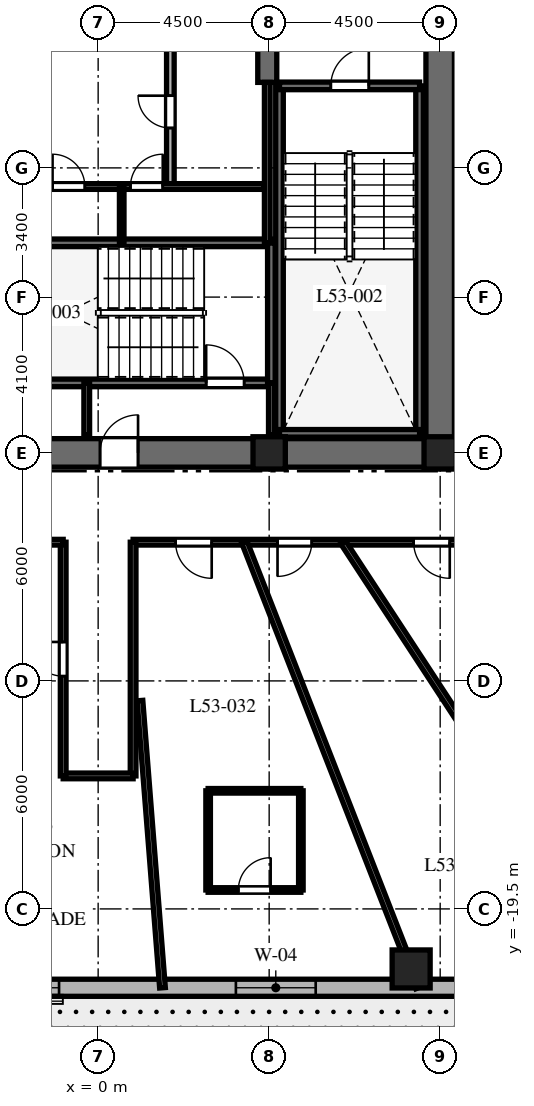
"""IFC4 building model, lengths in metres.
Left out: names, types, materials, properties, quantities, classifications, styles, units other than length and angle.
Written with IfcOpenShell. Run it as: python <this file> out.ifc"""

import sys

from ifc_helpers import new_model, si_unit, direction, frame, frame_2d, origin, origin_2d, place, context, subcontext, project, spatial, rectangle, extrude, element, fill, save


model = new_model("IFC4")
c1 = context("Model", 3, precision=1e-05, world=origin(), true_north=direction((0.0, 1.0)))
c2 = subcontext(c1, "Body", "Model", "MODEL_VIEW")
j1 = project(units=[si_unit("LENGTHUNIT", "METRE"), si_unit("PLANEANGLEUNIT", "RADIAN")], contexts=[c1])
p1 = place(None, origin())
s1 = spatial("IfcSite", under=j1, at=p1, CompositionType="ELEMENT")
p2 = place(p1, origin())
s2 = spatial("IfcBuilding", under=s1, at=p2, CompositionType="ELEMENT")
p3 = place(p2, frame((0.0, 0.0, 214.1)))
s3 = spatial("IfcBuildingStorey", under=s2, at=p3, CompositionType="ELEMENT", Elevation=214.1)
p4 = place(p3, frame((-9.375, -7.5, 0.0), z_axis=(0.0, 0.0, 1.0), x_axis=(1.0, 0.0, 0.0)))
e1 = element("IfcWall", 1, at=p4, inside=s3, PredefinedType="SHEAR", context=c2, shape_type="SweptSolid", body=[
    extrude(rectangle(XDim=18.75, YDim=0.75, at=frame_2d((9.375, 0.0))), origin(), (0.0, 0.0, 1.0), 3.8),
])
p5 = place(p4, frame((9.425, 0.0, 0.0)))
e2 = element("IfcOpeningElement", 2, at=p5, cuts=e1, PredefinedType="OPENING", context=c2, shape_type="SweptSolid", body=[
    extrude(rectangle(XDim=1.0, YDim=2.15, at=frame_2d((0.5, 1.075))), frame((0.0, 0.385, 0.0), z_axis=(0.0, -1.0, 0.0), x_axis=(1.0, 0.0, 0.0)), (0.0, 0.0, 1.0), 0.77),
])
p6 = place(p3, frame((9.0, -7.125, 0.0), z_axis=(0.0, 0.0, 1.0), x_axis=(0.0, 1.0, 0.0)))
e3 = element("IfcWall", 3, at=p6, inside=s3, PredefinedType="SHEAR", context=c2, shape_type="SweptSolid", body=[
    extrude(rectangle(XDim=14.25, YDim=0.75, at=frame_2d((7.125, 0.0))), origin(), (0.0, 0.0, 1.0), 3.8),
])
p7 = place(p6, frame((10.25, 0.0, 0.0)))
e4 = element("IfcOpeningElement", 4, at=p7, cuts=e3, PredefinedType="OPENING", context=c2, shape_type="SweptSolid", body=[
    extrude(rectangle(XDim=1.05, YDim=2.15, at=frame_2d((0.525, 1.075))), frame((0.0, 0.385, 0.0), z_axis=(0.0, -1.0, 0.0), x_axis=(1.0, 0.0, 0.0)), (0.0, 0.0, 1.0), 0.77),
])
p8 = place(p3, frame((4.45, 2.25, 0.0), z_axis=(0.0, 0.0, 1.0), x_axis=(0.0, 1.0, 0.0)))
e5 = element("IfcWall", 5, at=p8, inside=s3, PredefinedType="SHEAR", context=c2, shape_type="SweptSolid", body=[
    extrude(rectangle(XDim=4.875, YDim=0.5, at=frame_2d((2.438, 0.0))), origin(), (0.0, 0.0, 1.0), 3.8),
])
for number, where, z_axis, x_axis in (
    (6, (4.772, -6.985, 0.0), (0.0, 0.0, 1.0), (0.0, 1.0, 0.0)),
    (7, (8.458, -6.985, 0.0), (0.0, 0.0, 1.0), (0.0, 1.0, 0.0)),
):
    element("IfcWall", number, at=place(p3, frame(where, z_axis=z_axis, x_axis=x_axis)), inside=s3, PredefinedType="SHEAR", context=c2, shape_type="SweptSolid", body=[
        extrude(rectangle(XDim=9.143, YDim=0.2, at=frame_2d((4.572, 0.0))), origin(), (0.0, 0.0, 1.0), 3.8),
    ])
p9 = place(p3, frame((4.772, -6.985, 0.0), z_axis=(0.0, 0.0, 1.0), x_axis=(1.0, 0.0, 0.0)))
e8 = element("IfcWall", 8, at=p9, inside=s3, PredefinedType="SHEAR", context=c2, shape_type="SweptSolid", body=[
    extrude(rectangle(XDim=3.686, YDim=0.2, at=frame_2d((1.843, 0.0))), origin(), (0.0, 0.0, 1.0), 3.8),
])
p10 = place(p3, frame((4.772, 2.158, 0.0), z_axis=(0.0, 0.0, 1.0), x_axis=(1.0, 0.0, 0.0)))
e9 = element("IfcWall", 9, at=p10, inside=s3, PredefinedType="SHEAR", context=c2, shape_type="SweptSolid", body=[
    extrude(rectangle(XDim=3.686, YDim=0.2, at=frame_2d((1.843, 0.0))), origin(), (0.0, 0.0, 1.0), 3.8),
])
p11 = place(p10, frame((1.35, 0.0, 0.0)))
e10 = element("IfcOpeningElement", 10, at=p11, cuts=e9, PredefinedType="OPENING", context=c2, shape_type="SweptSolid", body=[
    extrude(rectangle(XDim=1.0, YDim=2.15, at=frame_2d((0.5, 1.075))), frame((0.0, 0.11, 0.0), z_axis=(0.0, -1.0, 0.0), x_axis=(1.0, 0.0, 0.0)), (0.0, 0.0, 1.0), 0.22),
])
p12 = place(p3, frame((-4.608, -5.658, 0.0), z_axis=(0.0, 0.0, 1.0), x_axis=(1.0, 0.0, 0.0)))
e11 = element("IfcWall", 11, at=p12, inside=s3, PredefinedType="SHEAR", context=c2, shape_type="SweptSolid", body=[
    extrude(rectangle(XDim=9.166, YDim=0.2, at=frame_2d((4.583, 0.0))), origin(), (0.0, 0.0, 1.0), 3.8),
])
p13 = place(p12, frame((7.45, 0.0, 0.0)))
e12 = element("IfcOpeningElement", 12, at=p13, cuts=e11, PredefinedType="OPENING", context=c2, shape_type="SweptSolid", body=[
    extrude(rectangle(XDim=1.0, YDim=2.15, at=frame_2d((0.5, 1.075))), frame((0.0, 0.11, 0.0), z_axis=(0.0, -1.0, 0.0), x_axis=(1.0, 0.0, 0.0)), (0.0, 0.0, 1.0), 0.22),
])
p14 = place(p3, frame((-4.608, -1.972, 0.0), z_axis=(0.0, 0.0, 1.0), x_axis=(1.0, 0.0, 0.0)))
e13 = element("IfcWall", 13, at=p14, inside=s3, PredefinedType="SHEAR", context=c2, shape_type="SweptSolid", body=[
    extrude(rectangle(XDim=9.166, YDim=0.2, at=frame_2d((4.583, 0.0))), origin(), (0.0, 0.0, 1.0), 3.8),
])
p15 = place(p3, frame((4.558, -5.658, 0.0), z_axis=(0.0, 0.0, 1.0), x_axis=(0.0, 1.0, 0.0)))
e14 = element("IfcWall", 14, at=p15, inside=s3, PredefinedType="SHEAR", context=c2, shape_type="SweptSolid", body=[
    extrude(rectangle(XDim=3.686, YDim=0.2, at=frame_2d((1.843, 0.0))), origin(), (0.0, 0.0, 1.0), 3.8),
])
for number, where, z_axis, x_axis in (
    (15, (4.5, -7.5, 0.0), (0.0, 0.0, 1.0), (1.0, 0.0, 0.0)),
    (16, (9.0, -7.5, 0.0), (0.0, 0.0, 1.0), (1.0, 0.0, 0.0)),
):
    element("IfcColumn", number, at=place(p3, frame(where, z_axis=z_axis, x_axis=x_axis)), inside=s3, PredefinedType="COLUMN", context=c2, shape_type="SweptSolid", body=[
        extrude(rectangle(XDim=0.85, YDim=0.85, at=origin_2d()), origin(), (0.0, 0.0, 1.0), 3.8),
    ])
p16 = place(p3, frame((8.236, -21.08, 0.0), z_axis=(0.0, 0.0, 1.0), x_axis=(1.0, 0.0, 0.0)))
e17 = element("IfcColumn", 17, at=p16, inside=s3, PredefinedType="COLUMN", context=c2, shape_type="SweptSolid", body=[
    extrude(rectangle(XDim=1.0, YDim=1.0, at=origin_2d()), origin(), (0.0, 0.0, 1.0), 3.8),
])
p17 = place(p3, frame((-11.298, -21.575, 0.0), z_axis=(0.0, 0.0, 1.0), x_axis=(1.0, 0.0, 0.0)))
e18 = element("IfcWall", 18, at=p17, inside=s3, PredefinedType="SOLIDWALL", context=c2, shape_type="SweptSolid", body=[
    extrude(rectangle(XDim=24.399, YDim=0.45, at=frame_2d((12.2, 0.0))), origin(), (0.0, 0.0, 1.0), 3.5),
])
p18 = place(p17, frame((2.55, 0.0, 0.0)))
e19 = element("IfcOpeningElement", 19, at=p18, cuts=e18, PredefinedType="OPENING", context=c2, shape_type="SweptSolid", body=[
    extrude(rectangle(XDim=1.0, YDim=2.15, at=frame_2d((0.5, 1.075))), frame((0.0, 0.235, 0.0), z_axis=(0.0, -1.0, 0.0), x_axis=(1.0, 0.0, 0.0)), (0.0, 0.0, 1.0), 0.47),
])
p19 = place(p17, frame((8.169, 0.0, 0.8)))
e20 = element("IfcOpeningElement", 20, at=p19, cuts=e18, PredefinedType="OPENING", context=c2, shape_type="SweptSolid", body=[
    extrude(rectangle(XDim=2.1, YDim=1.85, at=frame_2d((1.05, 0.925))), frame((0.0, 0.235, 0.0), z_axis=(0.0, -1.0, 0.0), x_axis=(1.0, 0.0, 0.0)), (0.0, 0.0, 1.0), 0.47),
])
p20 = place(p17, frame((14.922, 0.0, 0.8)))
e21 = element("IfcOpeningElement", 21, at=p20, cuts=e18, PredefinedType="OPENING", context=c2, shape_type="SweptSolid", body=[
    extrude(rectangle(XDim=2.1, YDim=1.85, at=frame_2d((1.05, 0.925))), frame((0.0, 0.235, 0.0), z_axis=(0.0, -1.0, 0.0), x_axis=(1.0, 0.0, 0.0)), (0.0, 0.0, 1.0), 0.47),
])
p21 = place(p17, frame((20.996, 0.0, 0.8)))
e22 = element("IfcOpeningElement", 22, at=p21, cuts=e18, PredefinedType="OPENING", context=c2, shape_type="SweptSolid", body=[
    extrude(rectangle(XDim=2.1, YDim=1.85, at=frame_2d((1.05, 0.925))), frame((0.0, 0.235, 0.0), z_axis=(0.0, -1.0, 0.0), x_axis=(1.0, 0.0, 0.0)), (0.0, 0.0, 1.0), 0.47),
])
for number, where, z_axis, x_axis in (
    (23, (-0.3, -7.02, 0.0), (0.0, 0.0, 1.0), (0.0, 1.0, 0.0)),
    (24, (4.558, -7.02, 0.0), (0.0, 0.0, 1.0), (0.0, 1.0, 0.0)),
):
    element("IfcWall", number, at=place(p3, frame(where, z_axis=z_axis, x_axis=x_axis)), inside=s3, PredefinedType="PARTITIONING", context=c2, shape_type="SweptSolid", body=[
        extrude(rectangle(XDim=1.362, YDim=0.15, at=frame_2d((0.681, 0.0))), origin(), (0.0, 0.0, 1.0), 3.5),
    ])
p22 = place(p3, frame((4.45, -1.972, 0.0), z_axis=(0.0, 0.0, 1.0), x_axis=(0.0, 1.0, 0.0)))
e25 = element("IfcWall", 25, at=p22, inside=s3, PredefinedType="PARTITIONING", context=c2, shape_type="SweptSolid", body=[
    extrude(rectangle(XDim=4.222, YDim=0.15, at=frame_2d((2.111, 0.0))), origin(), (0.0, 0.0, 1.0), 3.5),
])
p23 = place(p3, frame((1.9, -0.5, 0.0), z_axis=(0.0, 0.0, 1.0), x_axis=(0.0, 1.0, 0.0)))
e26 = element("IfcWall", 26, at=p23, inside=s3, PredefinedType="PARTITIONING", context=c2, shape_type="SweptSolid", body=[
    extrude(rectangle(XDim=4.44, YDim=0.2, at=frame_2d((2.22, 0.0))), origin(), (0.0, 0.0, 1.0), 3.5),
])
p24 = place(p23, frame((1.55, 0.0, 0.0)))
e27 = element("IfcOpeningElement", 27, at=p24, cuts=e26, PredefinedType="OPENING", context=c2, shape_type="SweptSolid", body=[
    extrude(rectangle(XDim=0.85, YDim=2.03, at=frame_2d((0.425, 1.015))), frame((0.0, 0.11, 0.0), z_axis=(0.0, -1.0, 0.0), x_axis=(1.0, 0.0, 0.0)), (0.0, 0.0, 1.0), 0.22),
])
p25 = place(p3, frame((-4.36, -0.49, 0.0), z_axis=(0.0, 0.0, 1.0), x_axis=(1.0, 0.0, 0.0)))
e28 = element("IfcWall", 28, at=p25, inside=s3, PredefinedType="PARTITIONING", context=c2, shape_type="SweptSolid", body=[
    extrude(rectangle(XDim=8.72, YDim=0.15, at=frame_2d((4.36, 0.0))), origin(), (0.0, 0.0, 1.0), 3.5),
])
p26 = place(p25, frame((3.16, 0.0, 0.0)))
e29 = element("IfcOpeningElement", 29, at=p26, cuts=e28, PredefinedType="OPENING", context=c2, shape_type="SweptSolid", body=[
    extrude(rectangle(XDim=0.85, YDim=2.03, at=frame_2d((0.425, 1.015))), frame((0.0, 0.085, 0.0), z_axis=(0.0, -1.0, 0.0), x_axis=(1.0, 0.0, 0.0)), (0.0, 0.0, 1.0), 0.17),
])
p27 = place(p25, frame((5.21, 0.0, 0.0)))
e30 = element("IfcOpeningElement", 30, at=p27, cuts=e28, PredefinedType="OPENING", context=c2, shape_type="SweptSolid", body=[
    extrude(rectangle(XDim=0.85, YDim=2.03, at=frame_2d((0.425, 1.015))), frame((0.0, 0.085, 0.0), z_axis=(0.0, -1.0, 0.0), x_axis=(1.0, 0.0, 0.0)), (0.0, 0.0, 1.0), 0.17),
])
p28 = place(p3, frame((0.62, -1.972, 0.0), z_axis=(0.0, 0.0, 1.0), x_axis=(0.0, 1.0, 0.0)))
e31 = element("IfcWall", 31, at=p28, inside=s3, PredefinedType="PARTITIONING", context=c2, shape_type="SweptSolid", body=[
    extrude(rectangle(XDim=1.472, YDim=0.12, at=frame_2d((0.736, 0.0))), origin(), (0.0, 0.0, 1.0), 3.5),
])
p29 = place(p3, frame((11.35, -9.85, 0.0), z_axis=(0.0, 0.0, 1.0), x_axis=(-1.0, 0.0, 0.0)))
e32 = element("IfcWall", 32, at=p29, inside=s3, PredefinedType="PARTITIONING", context=c2, shape_type="SweptSolid", body=[
    extrude(rectangle(XDim=10.43, YDim=0.15, at=frame_2d((5.215, 0.0))), origin(), (0.0, 0.0, 1.0), 2.99),
])
p30 = place(p29, frame((8.362, 0.0, 0.0)))
e33 = element("IfcOpeningElement", 33, at=p30, cuts=e32, PredefinedType="OPENING", context=c2, shape_type="SweptSolid", body=[
    extrude(rectangle(XDim=0.95, YDim=2.03, at=frame_2d((0.475, 1.015))), frame((0.0, 0.085, 0.0), z_axis=(0.0, -1.0, 0.0), x_axis=(1.0, 0.0, 0.0)), (0.0, 0.0, 1.0), 0.17),
])
p31 = place(p29, frame((5.73, 0.0, 0.0)))
e34 = element("IfcOpeningElement", 34, at=p31, cuts=e32, PredefinedType="OPENING", context=c2, shape_type="SweptSolid", body=[
    extrude(rectangle(XDim=0.9, YDim=2.03, at=frame_2d((0.45, 1.015))), frame((0.0, 0.085, 0.0), z_axis=(0.0, -1.0, 0.0), x_axis=(1.0, 0.0, 0.0)), (0.0, 0.0, 1.0), 0.17),
])
p32 = place(p29, frame((2.098, 0.0, 0.0)))
e35 = element("IfcOpeningElement", 35, at=p32, cuts=e32, PredefinedType="OPENING", context=c2, shape_type="SweptSolid", body=[
    extrude(rectangle(XDim=0.95, YDim=2.03, at=frame_2d((0.475, 1.015))), frame((0.0, 0.085, 0.0), z_axis=(0.0, -1.0, 0.0), x_axis=(1.0, 0.0, 0.0)), (0.0, 0.0, 1.0), 0.17),
])
p33 = place(p3, frame((0.92, -9.85, 0.0), z_axis=(0.0, 0.0, 1.0), x_axis=(0.0, -1.0, 0.0)))
e36 = element("IfcWall", 36, at=p33, inside=s3, PredefinedType="PARTITIONING", context=c2, shape_type="SweptSolid", body=[
    extrude(rectangle(XDim=6.15, YDim=0.15, at=frame_2d((3.075, 0.0))), origin(), (0.0, 0.0, 1.0), 3.026),
])
p34 = place(p3, frame((0.92, -16.0, 0.0), z_axis=(0.0, 0.0, 1.0), x_axis=(-1.0, 0.0, 0.0)))
e37 = element("IfcWall", 37, at=p34, inside=s3, PredefinedType="PARTITIONING", context=c2, shape_type="SweptSolid", body=[
    extrude(rectangle(XDim=1.84, YDim=0.15, at=frame_2d((0.92, 0.0))), origin(), (0.0, 0.0, 1.0), 3.5),
])
p35 = place(p3, frame((-0.92, -16.0, 0.0), z_axis=(0.0, 0.0, 1.0), x_axis=(0.0, 1.0, 0.0)))
e38 = element("IfcWall", 38, at=p35, inside=s3, PredefinedType="PARTITIONING", context=c2, shape_type="SweptSolid", body=[
    extrude(rectangle(XDim=6.15, YDim=0.15, at=frame_2d((3.075, 0.0))), origin(), (0.0, 0.0, 1.0), 3.026),
])
p36 = place(p35, frame((2.625, 0.0, 0.0)))
e39 = element("IfcOpeningElement", 39, at=p36, cuts=e38, PredefinedType="OPENING", context=c2, shape_type="SweptSolid", body=[
    extrude(rectangle(XDim=0.9, YDim=2.03, at=frame_2d((0.45, 1.015))), frame((0.0, 0.085, 0.0), z_axis=(0.0, -1.0, 0.0), x_axis=(1.0, 0.0, 0.0)), (0.0, 0.0, 1.0), 0.17),
])
p37 = place(p3, frame((-0.92, -9.85, 0.0), z_axis=(0.0, 0.0, 1.0), x_axis=(-1.0, 0.0, 0.0)))
e40 = element("IfcWall", 40, at=p37, inside=s3, PredefinedType="PARTITIONING", context=c2, shape_type="SweptSolid", body=[
    extrude(rectangle(XDim=10.43, YDim=0.15, at=frame_2d((5.215, 0.0))), origin(), (0.0, 0.0, 1.0), 2.99),
])
p38 = place(p37, frame((4.949, 0.0, 0.0)))
e41 = element("IfcOpeningElement", 41, at=p38, cuts=e40, PredefinedType="OPENING", context=c2, shape_type="SweptSolid", body=[
    extrude(rectangle(XDim=0.95, YDim=2.03, at=frame_2d((0.475, 1.015))), frame((0.0, 0.085, 0.0), z_axis=(0.0, -1.0, 0.0), x_axis=(1.0, 0.0, 0.0)), (0.0, 0.0, 1.0), 0.17),
])
p39 = place(p3, frame((1.1, -14.018, 0.0), z_axis=(0.0, 0.0, 1.0), x_axis=(0.078228275349, -0.996935472804, 0.0)))
e42 = element("IfcWall", 42, at=p39, inside=s3, PredefinedType="PARTITIONING", context=c2, shape_type="SweptSolid", body=[
    extrude(rectangle(XDim=7.581, YDim=0.15, at=frame_2d((3.79, 0.0))), origin(), (0.0, 0.0, 1.0), 2.74),
])
p40 = place(p3, frame((3.848, -9.85, 0.0), z_axis=(0.0, 0.0, 1.0), x_axis=(0.363921778212, -0.931429513889, 0.0)))
e43 = element("IfcWall", 43, at=p40, inside=s3, PredefinedType="PARTITIONING", context=c2, shape_type="SweptSolid", body=[
    extrude(rectangle(XDim=12.588, YDim=0.15, at=frame_2d((6.294, 0.0))), origin(), (0.0, 0.0, 1.0), 2.74),
])
p41 = place(p3, frame((6.444, -9.85, 0.0), z_axis=(0.0, 0.0, 1.0), x_axis=(0.547492333129, -0.836810698525, 0.0)))
e44 = element("IfcWall", 44, at=p41, inside=s3, PredefinedType="PARTITIONING", context=c2, shape_type="SweptSolid", body=[
    extrude(rectangle(XDim=13.616, YDim=0.15, at=frame_2d((6.808, 0.0))), origin(), (0.0, 0.0, 1.0), 2.74),
])
p42 = place(p3, frame((2.894, -19.002, 0.0), z_axis=(0.0, 0.0, 1.0), x_axis=(1.0, 0.0, 0.0)))
e45 = element("IfcWall", 45, at=p42, inside=s3, PredefinedType="PARTITIONING", context=c2, shape_type="SweptSolid", body=[
    extrude(rectangle(XDim=2.44, YDim=0.12, at=frame_2d((1.22, 0.0))), origin(), (0.0, 0.0, 1.0), 3.5),
])
p43 = place(p42, frame((0.795, 0.0, 0.0)))
e46 = element("IfcOpeningElement", 46, at=p43, cuts=e45, PredefinedType="OPENING", context=c2, shape_type="SweptSolid", body=[
    extrude(rectangle(XDim=0.85, YDim=2.03, at=frame_2d((0.425, 1.015))), frame((0.0, 0.07, 0.0), z_axis=(0.0, -1.0, 0.0), x_axis=(1.0, 0.0, 0.0)), (0.0, 0.0, 1.0), 0.14),
])
p44 = place(p3, frame((5.334, -19.002, 0.0), z_axis=(0.0, 0.0, 1.0), x_axis=(0.0, 1.0, 0.0)))
e47 = element("IfcWall", 47, at=p44, inside=s3, PredefinedType="PARTITIONING", context=c2, shape_type="SweptSolid", body=[
    extrude(rectangle(XDim=2.61, YDim=0.12, at=frame_2d((1.305, 0.0))), origin(), (0.0, 0.0, 1.0), 2.94),
])
p45 = place(p3, frame((5.334, -16.392, 0.0), z_axis=(0.0, 0.0, 1.0), x_axis=(-1.0, 0.0, 0.0)))
e48 = element("IfcWall", 48, at=p45, inside=s3, PredefinedType="PARTITIONING", context=c2, shape_type="SweptSolid", body=[
    extrude(rectangle(XDim=2.44, YDim=0.12, at=frame_2d((1.22, 0.0))), origin(), (0.0, 0.0, 1.0), 3.5),
])
p46 = place(p3, frame((2.894, -16.392, 0.0), z_axis=(0.0, 0.0, 1.0), x_axis=(0.0, -1.0, 0.0)))
e49 = element("IfcWall", 49, at=p46, inside=s3, PredefinedType="PARTITIONING", context=c2, shape_type="SweptSolid", body=[
    extrude(rectangle(XDim=2.61, YDim=0.12, at=frame_2d((1.305, 0.0))), origin(), (0.0, 0.0, 1.0), 2.94),
])
p47 = place(p19, origin())
e50 = element("IfcWindow", 50, at=p47, inside=s3, PartitioningType="SINGLE_PANEL", PredefinedType="WINDOW", context=c2, shape_type="SweptSolid", body=[
    extrude(rectangle(XDim=2.1, YDim=1.85, at=frame_2d((1.05, 0.925))), frame((0.0, 0.03, 0.0), z_axis=(0.0, -1.0, 0.0), x_axis=(1.0, 0.0, 0.0)), (0.0, 0.0, 1.0), 0.06),
])
fill(e20, e50)
p48 = place(p20, origin())
e51 = element("IfcWindow", 51, at=p48, inside=s3, PartitioningType="SINGLE_PANEL", PredefinedType="WINDOW", context=c2, shape_type="SweptSolid", body=[
    extrude(rectangle(XDim=2.1, YDim=1.85, at=frame_2d((1.05, 0.925))), frame((0.0, 0.03, 0.0), z_axis=(0.0, -1.0, 0.0), x_axis=(1.0, 0.0, 0.0)), (0.0, 0.0, 1.0), 0.06),
])
fill(e21, e51)
p49 = place(p11, origin())
e52 = element("IfcDoor", 52, at=p49, inside=s3, OperationType="SINGLE_SWING_RIGHT", PredefinedType="DOOR", context=c2, shape_type="SweptSolid", body=[
    extrude(rectangle(XDim=1.0, YDim=2.15, at=frame_2d((0.5, 1.075))), frame((0.0, 0.025, 0.0), z_axis=(0.0, -1.0, 0.0), x_axis=(1.0, 0.0, 0.0)), (0.0, 0.0, 1.0), 0.05),
])
fill(e10, e52)
p50 = place(p13, origin())
e53 = element("IfcDoor", 53, at=p50, inside=s3, OperationType="SINGLE_SWING_LEFT", PredefinedType="DOOR", context=c2, shape_type="SweptSolid", body=[
    extrude(rectangle(XDim=1.0, YDim=2.15, at=frame_2d((0.5, 1.075))), frame((0.0, 0.025, 0.0), z_axis=(0.0, -1.0, 0.0), x_axis=(1.0, 0.0, 0.0)), (0.0, 0.0, 1.0), 0.05),
])
fill(e12, e53)
p51 = place(p5, origin())
e54 = element("IfcDoor", 54, at=p51, inside=s3, OperationType="SINGLE_SWING_RIGHT", PredefinedType="DOOR", context=c2, shape_type="SweptSolid", body=[
    extrude(rectangle(XDim=1.0, YDim=2.15, at=frame_2d((0.5, 1.075))), frame((0.0, 0.025, 0.0), z_axis=(0.0, -1.0, 0.0), x_axis=(1.0, 0.0, 0.0)), (0.0, 0.0, 1.0), 0.05),
])
fill(e2, e54)
p52 = place(p24, origin())
e55 = element("IfcDoor", 55, at=p52, inside=s3, OperationType="SINGLE_SWING_RIGHT", PredefinedType="DOOR", context=c2, shape_type="SweptSolid", body=[
    extrude(rectangle(XDim=0.85, YDim=2.03, at=frame_2d((0.425, 1.015))), frame((0.0, 0.025, 0.0), z_axis=(0.0, -1.0, 0.0), x_axis=(1.0, 0.0, 0.0)), (0.0, 0.0, 1.0), 0.05),
])
fill(e27, e55)
p53 = place(p26, origin())
e56 = element("IfcDoor", 56, at=p53, inside=s3, OperationType="SINGLE_SWING_LEFT", PredefinedType="DOOR", context=c2, shape_type="SweptSolid", body=[
    extrude(rectangle(XDim=0.85, YDim=2.03, at=frame_2d((0.425, 1.015))), frame((0.0, 0.025, 0.0), z_axis=(0.0, -1.0, 0.0), x_axis=(1.0, 0.0, 0.0)), (0.0, 0.0, 1.0), 0.05),
])
fill(e29, e56)
p54 = place(p27, origin())
e57 = element("IfcDoor", 57, at=p54, inside=s3, OperationType="SINGLE_SWING_RIGHT", PredefinedType="DOOR", context=c2, shape_type="SweptSolid", body=[
    extrude(rectangle(XDim=0.85, YDim=2.03, at=frame_2d((0.425, 1.015))), frame((0.0, 0.025, 0.0), z_axis=(0.0, -1.0, 0.0), x_axis=(1.0, 0.0, 0.0)), (0.0, 0.0, 1.0), 0.05),
])
fill(e30, e57)
p55 = place(p36, origin())
e58 = element("IfcDoor", 58, at=p55, inside=s3, OperationType="SINGLE_SWING_RIGHT", PredefinedType="DOOR", context=c2, shape_type="SweptSolid", body=[
    extrude(rectangle(XDim=0.9, YDim=2.03, at=frame_2d((0.45, 1.015))), frame((0.0, 0.025, 0.0), z_axis=(0.0, -1.0, 0.0), x_axis=(1.0, 0.0, 0.0)), (0.0, 0.0, 1.0), 0.05),
])
fill(e39, e58)
p56 = place(p30, origin())
e59 = element("IfcDoor", 59, at=p56, inside=s3, OperationType="SINGLE_SWING_LEFT", PredefinedType="DOOR", context=c2, shape_type="SweptSolid", body=[
    extrude(rectangle(XDim=0.95, YDim=2.03, at=frame_2d((0.475, 1.015))), frame((0.0, 0.025, 0.0), z_axis=(0.0, -1.0, 0.0), x_axis=(1.0, 0.0, 0.0)), (0.0, 0.0, 1.0), 0.05),
])
fill(e33, e59)
p57 = place(p43, origin())
e60 = element("IfcDoor", 60, at=p57, inside=s3, OperationType="SINGLE_SWING_RIGHT", PredefinedType="DOOR", context=c2, shape_type="SweptSolid", body=[
    extrude(rectangle(XDim=0.85, YDim=2.03, at=frame_2d((0.425, 1.015))), frame((0.0, 0.025, 0.0), z_axis=(0.0, -1.0, 0.0), x_axis=(1.0, 0.0, 0.0)), (0.0, 0.0, 1.0), 0.05),
])
fill(e46, e60)
p58 = place(p31, origin())
e61 = element("IfcDoor", 61, at=p58, inside=s3, OperationType="SINGLE_SWING_RIGHT", PredefinedType="DOOR", context=c2, shape_type="SweptSolid", body=[
    extrude(rectangle(XDim=0.9, YDim=2.03, at=frame_2d((0.45, 1.015))), frame((0.0, 0.025, 0.0), z_axis=(0.0, -1.0, 0.0), x_axis=(1.0, 0.0, 0.0)), (0.0, 0.0, 1.0), 0.05),
])
fill(e34, e61)
p59 = place(p32, origin())
e62 = element("IfcDoor", 62, at=p59, inside=s3, OperationType="SINGLE_SWING_LEFT", PredefinedType="DOOR", context=c2, shape_type="SweptSolid", body=[
    extrude(rectangle(XDim=0.95, YDim=2.03, at=frame_2d((0.475, 1.015))), frame((0.0, 0.025, 0.0), z_axis=(0.0, -1.0, 0.0), x_axis=(1.0, 0.0, 0.0)), (0.0, 0.0, 1.0), 0.05),
])
fill(e35, e62)
save(model, sys.argv[1])
